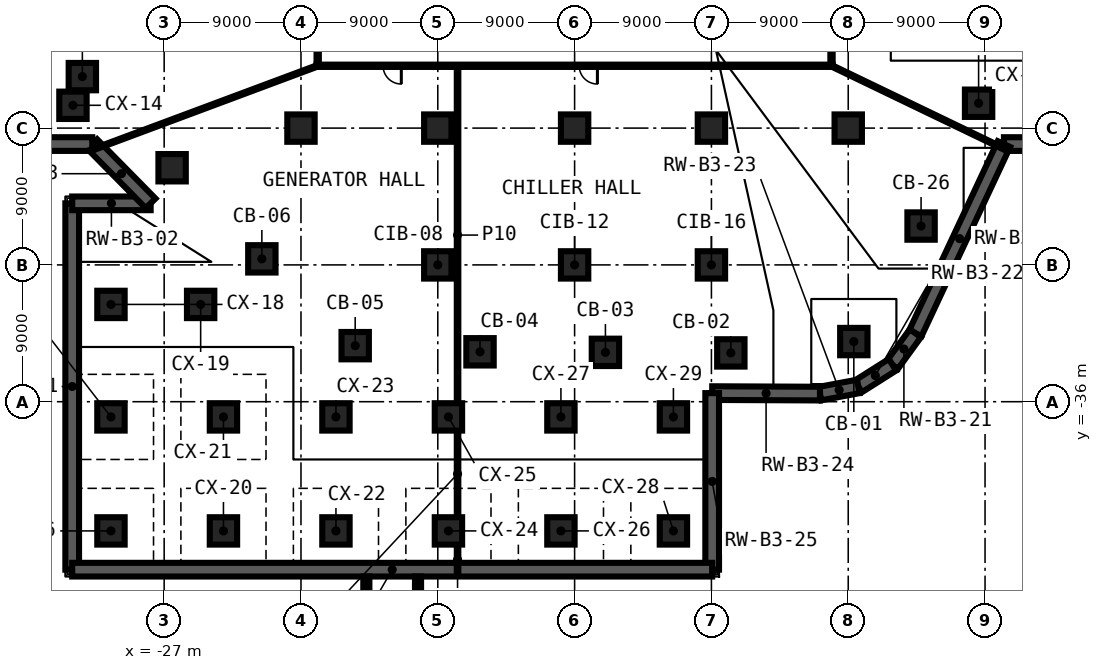
"""IFC4 building model, lengths in metres.
Left out: names, types, materials, properties, quantities, classifications, styles, units other than length and angle.
Written with IfcOpenShell. Run it as: python <this file> out.ifc"""

import sys

from ifc_helpers import new_model, si_unit, direction, frame, frame_2d, origin, origin_2d, place, context, subcontext, project, spatial, rectangle, extrude, element, fill, save


model = new_model("IFC4")
c1 = context("Model", 3, precision=1e-05, world=origin(), true_north=direction((0.0, 1.0)))
c2 = subcontext(c1, "Body", "Model", "MODEL_VIEW")
j1 = project(units=[si_unit("LENGTHUNIT", "METRE"), si_unit("PLANEANGLEUNIT", "RADIAN")], contexts=[c1])
p1 = place(None, origin())
s1 = spatial("IfcSite", under=j1, at=p1, CompositionType="ELEMENT")
p2 = place(p1, origin())
s2 = spatial("IfcBuilding", under=s1, at=p2, CompositionType="ELEMENT")
p3 = place(p2, frame((0.0, 0.0, -17.0)))
s3 = spatial("IfcBuildingStorey", under=s2, at=p3, CompositionType="ELEMENT", Elevation=-17.0)
for number, where, z_axis, x_axis in (
    (1, (18.368, -32.043, 0.0), (0.0, 0.0, 1.0), (1.0, 0.0, 0.0)),
    (2, (10.277, -32.79, 0.0), (0.0, 0.0, 1.0), (1.0, 0.0, 0.0)),
    (3, (2.027, -32.753, 0.0), (0.0, 0.0, 1.0), (1.0, 0.0, 0.0)),
    (4, (-6.222, -32.717, 0.0), (0.0, 0.0, 1.0), (1.0, 0.0, 0.0)),
    (5, (-14.434, -32.313, 0.0), (0.0, 0.0, 1.0), (1.0, 0.0, 0.0)),
    (6, (-20.574, -26.602, 0.0), (0.0, 0.0, 1.0), (1.0, 0.0, 0.0)),
    (7, (-26.478, -20.608, 0.0), (0.0, 0.0, 1.0), (1.0, 0.0, 0.0)),
    (8, (-32.382, -14.613, 0.0), (0.0, 0.0, 1.0), (1.0, 0.0, 0.0)),
    (9, (26.576, -16.364, 0.0), (0.0, 0.0, 1.0), (1.0, 0.0, 0.0)),
    (10, (22.792, -24.443, 0.0), (0.0, 0.0, 1.0), (1.0, 0.0, 0.0)),
    (11, (-18.0, -18.0, 0.0), (0.0, 0.0, 1.0), (1.0, 0.0, 0.0)),
    (12, (-9.0, -27.0, 0.0), (0.0, 0.0, 1.0), (1.0, 0.0, 0.0)),
    (13, (-9.0, -18.0, 0.0), (0.0, 0.0, 1.0), (1.0, 0.0, 0.0)),
    (14, (0.0, -27.0, 0.0), (0.0, 0.0, 1.0), (1.0, 0.0, 0.0)),
    (15, (0.0, -18.0, 0.0), (0.0, 0.0, 1.0), (1.0, 0.0, 0.0)),
    (16, (9.0, -27.0, 0.0), (0.0, 0.0, 1.0), (1.0, 0.0, 0.0)),
    (17, (9.0, -18.0, 0.0), (0.0, 0.0, 1.0), (1.0, 0.0, 0.0)),
    (18, (18.0, -18.0, 0.0), (0.0, 0.0, 1.0), (1.0, 0.0, 0.0)),
    (19, (-33.0, -16.5, 0.0), (0.0, 0.0, 1.0), (1.0, 0.0, 0.0)),
    (20, (-30.5, -44.5, 0.0), (0.0, 0.0, 1.0), (1.0, 0.0, 0.0)),
    (21, (-30.5, -37.0, 0.0), (0.0, 0.0, 1.0), (1.0, 0.0, 0.0)),
    (22, (-30.5, -29.6, 0.0), (0.0, 0.0, 1.0), (1.0, 0.0, 0.0)),
    (23, (-24.6, -29.6, 0.0), (0.0, 0.0, 1.0), (1.0, 0.0, 0.0)),
    (24, (-23.1, -44.5, 0.0), (0.0, 0.0, 1.0), (1.0, 0.0, 0.0)),
    (25, (-23.1, -37.0, 0.0), (0.0, 0.0, 1.0), (1.0, 0.0, 0.0)),
    (26, (-15.7, -44.5, 0.0), (0.0, 0.0, 1.0), (1.0, 0.0, 0.0)),
    (27, (-15.7, -37.0, 0.0), (0.0, 0.0, 1.0), (1.0, 0.0, 0.0)),
    (28, (-8.3, -44.5, 0.0), (0.0, 0.0, 1.0), (1.0, 0.0, 0.0)),
    (29, (-8.3, -37.0, 0.0), (0.0, 0.0, 1.0), (1.0, 0.0, 0.0)),
    (30, (-0.9, -44.5, 0.0), (0.0, 0.0, 1.0), (1.0, 0.0, 0.0)),
    (31, (-0.9, -37.0, 0.0), (0.0, 0.0, 1.0), (1.0, 0.0, 0.0)),
    (32, (6.5, -44.5, 0.0), (0.0, 0.0, 1.0), (1.0, 0.0, 0.0)),
    (33, (6.5, -37.0, 0.0), (0.0, 0.0, 1.0), (1.0, 0.0, 0.0)),
):
    element("IfcColumn", number, at=place(p3, frame(where, z_axis=z_axis, x_axis=x_axis)), inside=s3, PredefinedType="COLUMN", context=c2, shape_type="SweptSolid", body=[
        extrude(rectangle(XDim=1.8, YDim=1.8, at=origin_2d()), origin(), (0.0, 0.0, 1.0), 5.1),
    ])
p4 = place(p3, frame((-33.05, -47.05, 0.0), z_axis=(0.0, 0.0, 1.0), x_axis=(0.0, 1.0, 0.0)))
e34 = element("IfcWall", 34, at=p4, inside=s3, PredefinedType="SHEAR", context=c2, shape_type="SweptSolid", body=[
    extrude(rectangle(XDim=24.1, YDim=0.9, at=frame_2d((12.05, 0.0))), origin(), (0.0, 0.0, 1.0), 5.1),
])
p5 = place(p3, frame((-33.05, -22.95, 0.0), z_axis=(0.0, 0.0, 1.0), x_axis=(1.0, 0.0, 0.0)))
e35 = element("IfcWall", 35, at=p5, inside=s3, PredefinedType="SHEAR", context=c2, shape_type="SweptSolid", body=[
    extrude(rectangle(XDim=5.16, YDim=0.9, at=frame_2d((2.58, 0.0))), origin(), (0.0, 0.0, 1.0), 5.1),
])
p6 = place(p3, frame((-27.89, -22.95, 0.0), z_axis=(0.0, 0.0, 1.0), x_axis=(-0.70171190232, 0.71246081025, 0.0)))
e36 = element("IfcWall", 36, at=p6, inside=s3, PredefinedType="SHEAR", context=c2, shape_type="SweptSolid", body=[
    extrude(rectangle(XDim=5.474, YDim=0.9, at=frame_2d((2.737, 0.0))), origin(), (0.0, 0.0, 1.0), 5.1),
])
p7 = place(p3, frame((-31.731, -19.05, 0.0), z_axis=(0.0, 0.0, 1.0), x_axis=(-1.0, 0.0, 0.0)))
e37 = element("IfcWall", 37, at=p7, inside=s3, PredefinedType="SHEAR", context=c2, shape_type="SweptSolid", body=[
    extrude(rectangle(XDim=27.319, YDim=0.9, at=frame_2d((13.659, 0.0))), origin(), (0.0, 0.0, 1.0), 5.1),
])
p8 = place(p3, frame((59.05, -19.05, 0.0), z_axis=(0.0, 0.0, 1.0), x_axis=(-1.0, 0.0, 0.0)))
e38 = element("IfcWall", 38, at=p8, inside=s3, PredefinedType="SHEAR", context=c2, shape_type="SweptSolid", body=[
    extrude(rectangle(XDim=30.806, YDim=0.9, at=frame_2d((15.403, 0.0))), origin(), (0.0, 0.0, 1.0), 5.1),
])
p9 = place(p3, frame((28.244, -19.05, 0.0), z_axis=(0.0, 0.0, 1.0), x_axis=(-0.424123010069, -0.905604589393, 0.0)))
e39 = element("IfcWall", 39, at=p9, inside=s3, PredefinedType="SHEAR", context=c2, shape_type="SweptSolid", body=[
    extrude(rectangle(XDim=13.744, YDim=0.9, at=frame_2d((6.872, 0.0))), origin(), (0.0, 0.0, 1.0), 5.1),
])
p10 = place(p3, frame((22.415, -31.497, 0.0), z_axis=(0.0, 0.0, 1.0), x_axis=(-0.587162736068, -0.809468913161, 0.0)))
e40 = element("IfcWall", 40, at=p10, inside=s3, PredefinedType="SHEAR", context=c2, shape_type="SweptSolid", body=[
    extrude(rectangle(XDim=2.562, YDim=0.9, at=frame_2d((1.281, 0.0))), origin(), (0.0, 0.0, 1.0), 5.1),
])
p11 = place(p3, frame((20.91, -33.571, 0.0), z_axis=(0.0, 0.0, 1.0), x_axis=(-0.845024751893, -0.534727190901, 0.0)))
e41 = element("IfcWall", 41, at=p11, inside=s3, PredefinedType="SHEAR", context=c2, shape_type="SweptSolid", body=[
    extrude(rectangle(XDim=2.664, YDim=0.9, at=frame_2d((1.332, 0.0))), origin(), (0.0, 0.0, 1.0), 5.1),
])
p12 = place(p3, frame((18.659, -34.995, 0.0), z_axis=(0.0, 0.0, 1.0), x_axis=(-0.98292500595, -0.184006610421, 0.0)))
e42 = element("IfcWall", 42, at=p12, inside=s3, PredefinedType="SHEAR", context=c2, shape_type="SweptSolid", body=[
    extrude(rectangle(XDim=2.562, YDim=0.9, at=frame_2d((1.281, 0.0))), origin(), (0.0, 0.0, 1.0), 5.1),
])
p13 = place(p3, frame((16.141, -35.467, 0.0), z_axis=(0.0, 0.0, 1.0), x_axis=(-0.999989983008, 0.004475922662, 0.0)))
e43 = element("IfcWall", 43, at=p13, inside=s3, PredefinedType="SHEAR", context=c2, shape_type="SweptSolid", body=[
    extrude(rectangle(XDim=7.091, YDim=0.9, at=frame_2d((3.545, 0.0))), origin(), (0.0, 0.0, 1.0), 5.1),
])
p14 = place(p3, frame((9.05, -35.435, 0.0), z_axis=(0.0, 0.0, 1.0), x_axis=(0.0, -1.0, 0.0)))
e44 = element("IfcWall", 44, at=p14, inside=s3, PredefinedType="SHEAR", context=c2, shape_type="SweptSolid", body=[
    extrude(rectangle(XDim=11.615, YDim=0.9, at=frame_2d((5.808, 0.0))), origin(), (0.0, 0.0, 1.0), 5.1),
])
p15 = place(p3, frame((9.05, -47.05, 0.0), z_axis=(0.0, 0.0, 1.0), x_axis=(-1.0, 0.0, 0.0)))
e45 = element("IfcWall", 45, at=p15, inside=s3, PredefinedType="SHEAR", context=c2, shape_type="SweptSolid", body=[
    extrude(rectangle(XDim=42.1, YDim=0.9, at=frame_2d((21.05, 0.0))), origin(), (0.0, 0.0, 1.0), 5.1),
])
p16 = place(p3, frame((16.975, -13.9, 0.0), z_axis=(0.0, 0.0, 1.0), x_axis=(-1.0, 0.0, 0.0)))
e46 = element("IfcWall", 46, at=p16, inside=s3, PredefinedType="PARTITIONING", context=c2, shape_type="SweptSolid", body=[
    extrude(rectangle(XDim=33.95, YDim=0.15, at=frame_2d((16.975, 0.0))), origin(), (0.0, 0.0, 1.0), 5.1),
])
p17 = place(p16, frame((28.375, 0.0, 0.0)))
e47 = element("IfcOpeningElement", 47, at=p17, cuts=e46, PredefinedType="OPENING", context=c2, shape_type="SweptSolid", body=[
    extrude(rectangle(XDim=1.2, YDim=2.1, at=frame_2d((0.6, 1.05))), frame((0.0, 0.085, 0.0), z_axis=(0.0, -1.0, 0.0), x_axis=(1.0, 0.0, 0.0)), (0.0, 0.0, 1.0), 0.17),
])
p18 = place(p16, frame((15.475, 0.0, 0.0)))
e48 = element("IfcOpeningElement", 48, at=p18, cuts=e46, PredefinedType="OPENING", context=c2, shape_type="SweptSolid", body=[
    extrude(rectangle(XDim=1.2, YDim=2.1, at=frame_2d((0.6, 1.05))), frame((0.0, 0.085, 0.0), z_axis=(0.0, -1.0, 0.0), x_axis=(1.0, 0.0, 0.0)), (0.0, 0.0, 1.0), 0.17),
])
p19 = place(p3, frame((-31.796, -19.454, 0.0), z_axis=(0.0, 0.0, 1.0), x_axis=(0.936976966906, 0.349391132526, 0.0)))
e49 = element("IfcWall", 49, at=p19, inside=s3, PredefinedType="PARTITIONING", context=c2, shape_type="SweptSolid", body=[
    extrude(rectangle(XDim=15.898, YDim=0.1, at=frame_2d((7.949, 0.0))), origin(), (0.0, 0.0, 1.0), 5.1),
])
p20 = place(p3, frame((16.9, 13.825, 0.0), z_axis=(0.0, 0.0, 1.0), x_axis=(0.0, -1.0, 0.0)))
e50 = element("IfcWall", 50, at=p20, inside=s3, PredefinedType="PARTITIONING", context=c2, shape_type="SweptSolid", body=[
    extrude(rectangle(XDim=27.65, YDim=0.15, at=frame_2d((13.825, 0.0))), origin(), (0.0, 0.0, 1.0), 5.1),
])
p21 = place(p20, frame((18.445, 0.0, 0.0)))
e51 = element("IfcOpeningElement", 51, at=p21, cuts=e50, PredefinedType="OPENING", context=c2, shape_type="SweptSolid", body=[
    extrude(rectangle(XDim=1.2, YDim=2.1, at=frame_2d((0.6, 1.05))), frame((0.0, 0.085, 0.0), z_axis=(0.0, -1.0, 0.0), x_axis=(1.0, 0.0, 0.0)), (0.0, 0.0, 1.0), 0.17),
])
p22 = place(p3, frame((-7.7, -47.38, 0.0), z_axis=(0.0, 0.0, 1.0), x_axis=(0.0, 1.0, 0.0)))
e52 = element("IfcWall", 52, at=p22, inside=s3, PredefinedType="PARTITIONING", context=c2, shape_type="SweptSolid", body=[
    extrude(rectangle(XDim=1.98, YDim=0.1, at=frame_2d((0.99, 0.0))), origin(), (0.0, 0.0, 1.0), 5.1),
])
p23 = place(p3, frame((-7.7, -43.6, 0.0), z_axis=(0.0, 0.0, 1.0), x_axis=(0.0, 1.0, 0.0)))
e53 = element("IfcWall", 53, at=p23, inside=s3, PredefinedType="PARTITIONING", context=c2, shape_type="SweptSolid", body=[
    extrude(rectangle(XDim=5.7, YDim=0.1, at=frame_2d((2.85, 0.0))), origin(), (0.0, 0.0, 1.0), 5.1),
])
p24 = place(p3, frame((-7.7, -36.1, 0.0), z_axis=(0.0, 0.0, 1.0), x_axis=(0.0, 1.0, 0.0)))
e54 = element("IfcWall", 54, at=p24, inside=s3, PredefinedType="PARTITIONING", context=c2, shape_type="SweptSolid", body=[
    extrude(rectangle(XDim=22.125, YDim=0.1, at=frame_2d((11.062, 0.0))), origin(), (0.0, 0.0, 1.0), 5.1),
])
p25 = place(p3, frame((-16.9, -13.825, 0.0), z_axis=(0.0, 0.0, 1.0), x_axis=(0.0, 1.0, 0.0)))
e55 = element("IfcWall", 55, at=p25, inside=s3, PredefinedType="PARTITIONING", context=c2, shape_type="SweptSolid", body=[
    extrude(rectangle(XDim=27.65, YDim=0.15, at=frame_2d((13.825, 0.0))), origin(), (0.0, 0.0, 1.0), 5.1),
])
p26 = place(p25, frame((18.445, 0.0, 0.0)))
e56 = element("IfcOpeningElement", 56, at=p26, cuts=e55, PredefinedType="OPENING", context=c2, shape_type="SweptSolid", body=[
    extrude(rectangle(XDim=1.2, YDim=2.1, at=frame_2d((0.6, 1.05))), frame((0.0, 0.085, 0.0), z_axis=(0.0, -1.0, 0.0), x_axis=(1.0, 0.0, 0.0)), (0.0, 0.0, 1.0), 0.17),
])
p27 = place(p3, frame((16.9, -13.9, 0.0), z_axis=(0.0, 0.0, 1.0), x_axis=(0.901001946138, -0.433815044754, 0.0)))
e57 = element("IfcWall", 57, at=p27, inside=s3, PredefinedType="PARTITIONING", context=c2, shape_type="SweptSolid", body=[
    extrude(rectangle(XDim=12.788, YDim=0.1, at=frame_2d((6.394, 0.0))), origin(), (0.0, 0.0, 1.0), 5.1),
])
p28 = place(p2, origin())
s4 = spatial("IfcBuildingStorey", under=s2, at=p28, CompositionType="ELEMENT", Elevation=0.0)
for number, where, z_axis, x_axis in (
    (58, (-13.7, -47.5, -17.0), (0.0, 0.0, 1.0), (0.0, -1.0, 0.0)),
    (59, (-10.3, -47.5, -17.0), (0.0, 0.0, 1.0), (0.0, -1.0, 0.0)),
):
    element("IfcWall", number, at=place(p28, frame(where, z_axis=z_axis, x_axis=x_axis)), inside=s4, PredefinedType="SHEAR", context=c2, shape_type="SweptSolid", body=[
        extrude(rectangle(XDim=8.6, YDim=0.4, at=frame_2d((4.3, 0.0))), origin(), (0.0, 0.0, 1.0), 16.7),
    ])
p29 = place(p17, origin())
e60 = element("IfcDoor", 60, at=p29, inside=s3, OperationType="SINGLE_SWING_LEFT", PredefinedType="DOOR", context=c2, shape_type="SweptSolid", body=[
    extrude(rectangle(XDim=1.2, YDim=2.1, at=frame_2d((0.6, 1.05))), frame((0.0, 0.025, 0.0), z_axis=(0.0, -1.0, 0.0), x_axis=(1.0, 0.0, 0.0)), (0.0, 0.0, 1.0), 0.05),
])
fill(e47, e60)
p30 = place(p18, origin())
e61 = element("IfcDoor", 61, at=p30, inside=s3, OperationType="SINGLE_SWING_RIGHT", PredefinedType="DOOR", context=c2, shape_type="SweptSolid", body=[
    extrude(rectangle(XDim=1.2, YDim=2.1, at=frame_2d((0.6, 1.05))), frame((0.0, 0.025, 0.0), z_axis=(0.0, -1.0, 0.0), x_axis=(1.0, 0.0, 0.0)), (0.0, 0.0, 1.0), 0.05),
])
fill(e48, e61)
save(model, sys.argv[1])
